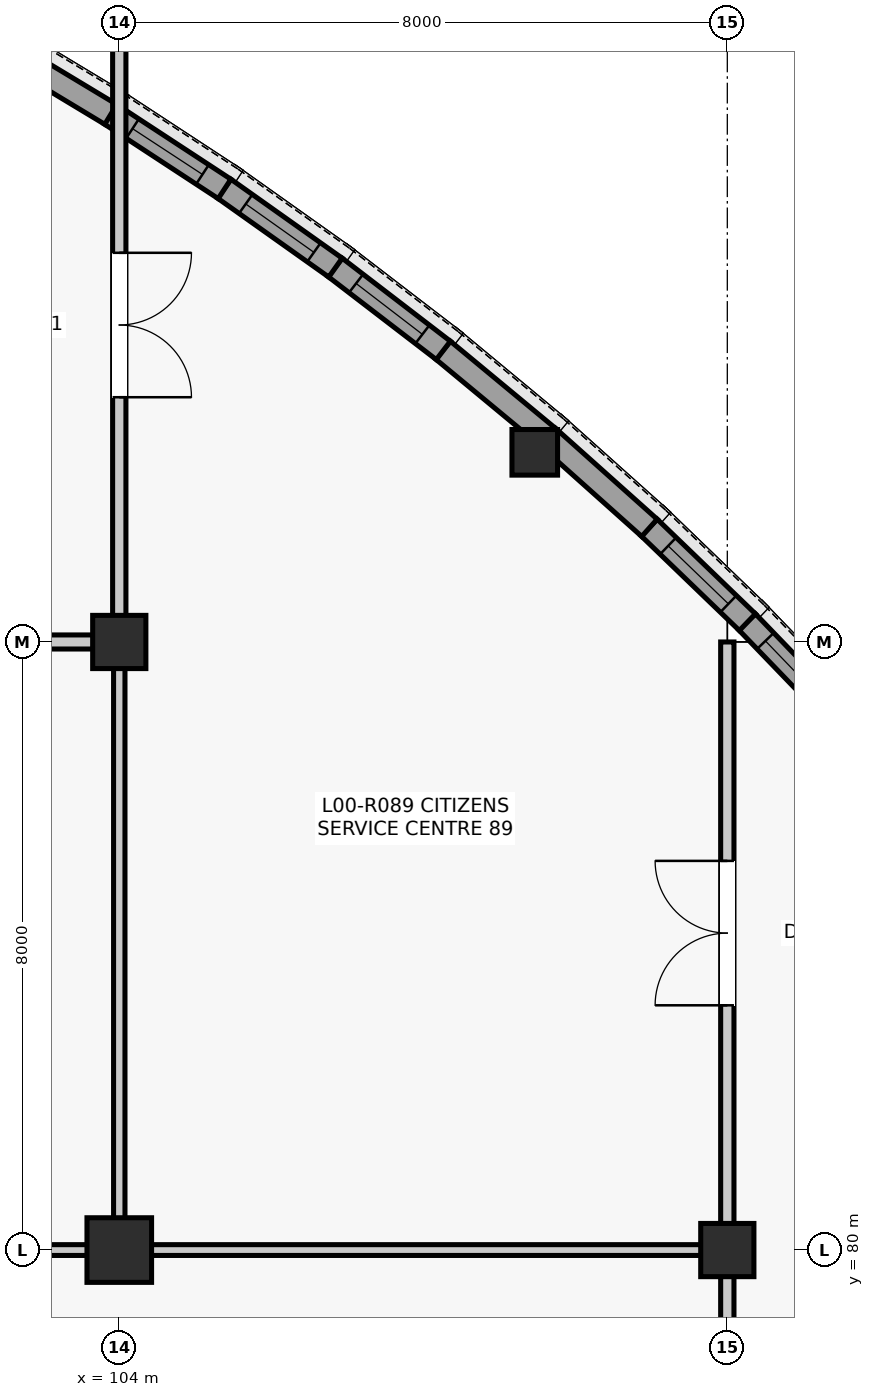
"""IFC4 building model, lengths in metres.
Left out: names, types, materials, properties, quantities, classifications, styles, units other than length and angle.
Written with IfcOpenShell. Run it as: python <this file> out.ifc"""

import sys

from ifc_helpers import new_model, si_unit, direction, frame, frame_2d, origin, origin_2d, place, context, subcontext, project, spatial, rectangle, extrude, element, fill, save


model = new_model("IFC4")
c1 = context("Model", 3, precision=1e-05, world=origin(), true_north=direction((0.0, 1.0)))
c2 = subcontext(c1, "Body", "Model", "MODEL_VIEW")
j1 = project(units=[si_unit("LENGTHUNIT", "METRE"), si_unit("PLANEANGLEUNIT", "RADIAN")], contexts=[c1])
p1 = place(None, origin())
s1 = spatial("IfcSite", under=j1, at=p1, CompositionType="ELEMENT")
p2 = place(p1, origin())
s2 = spatial("IfcBuilding", under=s1, at=p2, CompositionType="ELEMENT")
p3 = place(p2, origin())
s3 = spatial("IfcBuildingStorey", under=s2, at=p3, CompositionType="ELEMENT", Elevation=0.0)
p4 = place(p3, frame((104.0, 80.0, 0.0), z_axis=(0.0, 0.0, 1.0), x_axis=(1.0, 0.0, 0.0)))
e1 = element("IfcColumn", 1, at=p4, inside=s3, PredefinedType="COLUMN", context=c2, shape_type="SweptSolid", body=[
    extrude(rectangle(XDim=0.85, YDim=0.85, at=origin_2d()), origin(), (0.0, 0.0, 1.0), 5.28),
])
for number, where, z_axis, x_axis in (
    (2, (104.0, 88.0, 0.0), (0.0, 0.0, 1.0), (1.0, 0.0, 0.0)),
    (3, (112.0, 80.0, 0.0), (0.0, 0.0, 1.0), (1.0, 0.0, 0.0)),
):
    element("IfcColumn", number, at=place(p3, frame(where, z_axis=z_axis, x_axis=x_axis)), inside=s3, PredefinedType="COLUMN", context=c2, shape_type="SweptSolid", body=[
        extrude(rectangle(XDim=0.7, YDim=0.7, at=origin_2d()), origin(), (0.0, 0.0, 1.0), 5.28),
    ])
p5 = place(p3, frame((109.467, 90.495, 0.0), z_axis=(0.0, 0.0, 1.0), x_axis=(1.0, 0.0, 0.0)))
e4 = element("IfcColumn", 4, at=p5, inside=s3, PredefinedType="COLUMN", context=c2, shape_type="SweptSolid", body=[
    extrude(rectangle(XDim=0.6, YDim=0.6, at=origin_2d()), origin(), (0.0, 0.0, 1.0), 5.28),
])
p6 = place(p3, frame((113.506, 86.971, 0.0), z_axis=(0.0, 0.0, 1.0), x_axis=(-0.693722700342, 0.720242191926, 0.0)))
e5 = element("IfcWall", 5, at=p6, inside=s3, PredefinedType="SOLIDWALL", context=c2, shape_type="SweptSolid", body=[
    extrude(rectangle(XDim=1.795, YDim=0.305, at=frame_2d((0.897, 0.0))), origin(), (0.0, 0.0, 1.0), 5.035),
])
p7 = place(p6, frame((0.347, 0.0, 0.9)))
e6 = element("IfcOpeningElement", 6, at=p7, cuts=e5, PredefinedType="OPENING", context=c2, shape_type="SweptSolid", body=[
    extrude(rectangle(XDim=1.1, YDim=2.1, at=frame_2d((0.55, 1.05))), frame((0.0, 0.162, 0.0), z_axis=(0.0, -1.0, 0.0), x_axis=(1.0, 0.0, 0.0)), (0.0, 0.0, 1.0), 0.325),
])
p8 = place(p3, frame((112.264, 88.26, 0.0), z_axis=(0.0, 0.0, 1.0), x_axis=(-0.720242191926, 0.693722700342, 0.0)))
e7 = element("IfcWall", 7, at=p8, inside=s3, PredefinedType="SOLIDWALL", context=c2, shape_type="SweptSolid", body=[
    extrude(rectangle(XDim=1.795, YDim=0.305, at=frame_2d((0.897, 0.0))), origin(), (0.0, 0.0, 1.0), 5.035),
])
p9 = place(p8, frame((0.347, 0.0, 0.9)))
e8 = element("IfcOpeningElement", 8, at=p9, cuts=e7, PredefinedType="OPENING", context=c2, shape_type="SweptSolid", body=[
    extrude(rectangle(XDim=1.1, YDim=2.1, at=frame_2d((0.55, 1.05))), frame((0.0, 0.162, 0.0), z_axis=(0.0, -1.0, 0.0), x_axis=(1.0, 0.0, 0.0)), (0.0, 0.0, 1.0), 0.325),
])
p10 = place(p3, frame((110.976, 89.502, 0.0), z_axis=(0.0, 0.0, 1.0), x_axis=(-0.745703543965, 0.666277888361, 0.0)))
e9 = element("IfcWall", 9, at=p10, inside=s3, PredefinedType="SOLIDWALL", context=c2, shape_type="SweptSolid", body=[
    extrude(rectangle(XDim=1.795, YDim=0.305, at=frame_2d((0.897, 0.0))), origin(), (0.0, 0.0, 1.0), 5.035),
])
p11 = place(p3, frame((109.642, 90.694, 0.0), z_axis=(0.0, 0.0, 1.0), x_axis=(-0.769991012207, 0.638054732073, 0.0)))
e10 = element("IfcWall", 10, at=p11, inside=s3, PredefinedType="SOLIDWALL", context=c2, shape_type="SweptSolid", body=[
    extrude(rectangle(XDim=1.795, YDim=0.305, at=frame_2d((0.897, 0.0))), origin(), (0.0, 0.0, 1.0), 5.035),
])
p12 = place(p3, frame((108.264, 91.836, 0.0), z_axis=(0.0, 0.0, 1.0), x_axis=(-0.793341406114, 0.608776981616, 0.0)))
e11 = element("IfcWall", 11, at=p12, inside=s3, PredefinedType="SOLIDWALL", context=c2, shape_type="SweptSolid", body=[
    extrude(rectangle(XDim=1.795, YDim=0.305, at=frame_2d((0.897, 0.0))), origin(), (0.0, 0.0, 1.0), 5.035),
])
p13 = place(p12, frame((0.347, 0.0, 0.9)))
e12 = element("IfcOpeningElement", 12, at=p13, cuts=e11, PredefinedType="OPENING", context=c2, shape_type="SweptSolid", body=[
    extrude(rectangle(XDim=1.1, YDim=2.1, at=frame_2d((0.55, 1.05))), frame((0.0, 0.162, 0.0), z_axis=(0.0, -1.0, 0.0), x_axis=(1.0, 0.0, 0.0)), (0.0, 0.0, 1.0), 0.325),
])
p14 = place(p3, frame((106.844, 92.925, 0.0), z_axis=(0.0, 0.0, 1.0), x_axis=(-0.815567185578, 0.578662393636, 0.0)))
e13 = element("IfcWall", 13, at=p14, inside=s3, PredefinedType="SOLIDWALL", context=c2, shape_type="SweptSolid", body=[
    extrude(rectangle(XDim=1.795, YDim=0.305, at=frame_2d((0.897, 0.0))), origin(), (0.0, 0.0, 1.0), 5.035),
])
p15 = place(p14, frame((0.348, 0.0, 0.9)))
e14 = element("IfcOpeningElement", 14, at=p15, cuts=e13, PredefinedType="OPENING", context=c2, shape_type="SweptSolid", body=[
    extrude(rectangle(XDim=1.1, YDim=2.1, at=frame_2d((0.55, 1.05))), frame((0.0, 0.162, 0.0), z_axis=(0.0, -1.0, 0.0), x_axis=(1.0, 0.0, 0.0)), (0.0, 0.0, 1.0), 0.325),
])
p16 = place(p3, frame((105.385, 93.961, 0.0), z_axis=(0.0, 0.0, 1.0), x_axis=(-0.836686786408, 0.547681678944, 0.0)))
e15 = element("IfcWall", 15, at=p16, inside=s3, PredefinedType="SOLIDWALL", context=c2, shape_type="SweptSolid", body=[
    extrude(rectangle(XDim=1.795, YDim=0.305, at=frame_2d((0.897, 0.0))), origin(), (0.0, 0.0, 1.0), 5.035),
])
p17 = place(p16, frame((0.347, 0.0, 0.9)))
e16 = element("IfcOpeningElement", 16, at=p17, cuts=e15, PredefinedType="OPENING", context=c2, shape_type="SweptSolid", body=[
    extrude(rectangle(XDim=1.1, YDim=2.1, at=frame_2d((0.55, 1.05))), frame((0.0, 0.162, 0.0), z_axis=(0.0, -1.0, 0.0), x_axis=(1.0, 0.0, 0.0)), (0.0, 0.0, 1.0), 0.325),
])
p18 = place(p3, frame((103.888, 94.941, 0.0), z_axis=(0.0, 0.0, 1.0), x_axis=(-0.856543302071, 0.51607516088, 0.0)))
e17 = element("IfcWall", 17, at=p18, inside=s3, PredefinedType="SOLIDWALL", context=c2, shape_type="SweptSolid", body=[
    extrude(rectangle(XDim=1.795, YDim=0.305, at=frame_2d((0.897, 0.0))), origin(), (0.0, 0.0, 1.0), 5.035),
])
p19 = place(p3, frame((96.189, 80.0, 0.0), z_axis=(0.0, 0.0, 1.0), x_axis=(1.0, 0.0, 0.0)))
e18 = element("IfcWall", 18, at=p19, inside=s3, PredefinedType="PARTITIONING", context=c2, shape_type="SweptSolid", body=[
    extrude(rectangle(XDim=7.396, YDim=0.142, at=frame_2d((3.698, 0.0))), origin(), (0.0, 0.0, 1.0), 4.336),
])
p20 = place(p3, frame((104.0, 80.415, 0.0), z_axis=(0.0, 0.0, 1.0), x_axis=(0.0, 1.0, 0.0)))
e19 = element("IfcWall", 19, at=p20, inside=s3, PredefinedType="PARTITIONING", context=c2, shape_type="SweptSolid", body=[
    extrude(rectangle(XDim=7.245, YDim=0.15, at=frame_2d((3.623, 0.0))), origin(), (0.0, 0.0, 1.0), 4.471),
])
p21 = place(p3, frame((96.34, 88.0, 0.0), z_axis=(0.0, 0.0, 1.0), x_axis=(1.0, 0.0, 0.0)))
e20 = element("IfcWall", 20, at=p21, inside=s3, PredefinedType="PARTITIONING", context=c2, shape_type="SweptSolid", body=[
    extrude(rectangle(XDim=7.32, YDim=0.185, at=frame_2d((3.66, 0.0))), origin(), (0.0, 0.0, 1.0), 4.404),
])
p22 = place(p3, frame((104.0, 88.34, 0.0), z_axis=(0.0, 0.0, 1.0), x_axis=(0.0, 1.0, 0.0)))
e21 = element("IfcWall", 21, at=p22, inside=s3, PredefinedType="PARTITIONING", context=c2, shape_type="SweptSolid", body=[
    extrude(rectangle(XDim=7.66, YDim=0.175, at=frame_2d((3.83, 0.0))), origin(), (0.0, 0.0, 1.0), 5.025),
])
p23 = place(p22, frame((2.88, 0.0, 0.0)))
e22 = element("IfcOpeningElement", 22, at=p23, cuts=e21, PredefinedType="OPENING", context=c2, shape_type="SweptSolid", body=[
    extrude(rectangle(XDim=1.9, YDim=2.38, at=frame_2d((0.95, 1.19))), frame((0.0, 0.097, 0.0), z_axis=(0.0, -1.0, 0.0), x_axis=(1.0, 0.0, 0.0)), (0.0, 0.0, 1.0), 0.195),
])
p24 = place(p3, frame((112.0, 72.34, 0.0), z_axis=(0.0, 0.0, 1.0), x_axis=(0.0, 1.0, 0.0)))
e23 = element("IfcWall", 23, at=p24, inside=s3, PredefinedType="PARTITIONING", context=c2, shape_type="SweptSolid", body=[
    extrude(rectangle(XDim=7.32, YDim=0.175, at=frame_2d((3.66, 0.0))), origin(), (0.0, 0.0, 1.0), 4.471),
])
p25 = place(p24, frame((2.71, 0.0, 0.0)))
e24 = element("IfcOpeningElement", 24, at=p25, cuts=e23, PredefinedType="OPENING", context=c2, shape_type="SweptSolid", body=[
    extrude(rectangle(XDim=1.9, YDim=2.38, at=frame_2d((0.95, 1.19))), frame((0.0, 0.097, 0.0), z_axis=(0.0, -1.0, 0.0), x_axis=(1.0, 0.0, 0.0)), (0.0, 0.0, 1.0), 0.195),
])
p26 = place(p3, frame((104.415, 80.0, 0.0), z_axis=(0.0, 0.0, 1.0), x_axis=(1.0, 0.0, 0.0)))
e25 = element("IfcWall", 25, at=p26, inside=s3, PredefinedType="PARTITIONING", context=c2, shape_type="SweptSolid", body=[
    extrude(rectangle(XDim=7.245, YDim=0.142, at=frame_2d((3.623, 0.0))), origin(), (0.0, 0.0, 1.0), 4.404),
])
p27 = place(p3, frame((112.0, 80.34, 0.0), z_axis=(0.0, 0.0, 1.0), x_axis=(0.0, 1.0, 0.0)))
e26 = element("IfcWall", 26, at=p27, inside=s3, PredefinedType="PARTITIONING", context=c2, shape_type="SweptSolid", body=[
    extrude(rectangle(XDim=7.66, YDim=0.175, at=frame_2d((3.83, 0.0))), origin(), (0.0, 0.0, 1.0), 5.025),
])
p28 = place(p27, frame((2.88, 0.0, 0.0)))
e27 = element("IfcOpeningElement", 27, at=p28, cuts=e26, PredefinedType="OPENING", context=c2, shape_type="SweptSolid", body=[
    extrude(rectangle(XDim=1.9, YDim=2.38, at=frame_2d((0.95, 1.19))), frame((0.0, 0.097, 0.0), z_axis=(0.0, -1.0, 0.0), x_axis=(1.0, 0.0, 0.0)), (0.0, 0.0, 1.0), 0.195),
])
p29 = place(p7, origin())
e28 = element("IfcWindow", 28, at=p29, inside=s3, PartitioningType="SINGLE_PANEL", PredefinedType="WINDOW", context=c2, shape_type="SweptSolid", body=[
    extrude(rectangle(XDim=1.1, YDim=2.1, at=frame_2d((0.55, 1.05))), frame((0.0, 0.03, 0.0), z_axis=(0.0, -1.0, 0.0), x_axis=(1.0, 0.0, 0.0)), (0.0, 0.0, 1.0), 0.06),
])
fill(e6, e28)
p30 = place(p9, origin())
e29 = element("IfcWindow", 29, at=p30, inside=s3, PartitioningType="SINGLE_PANEL", PredefinedType="WINDOW", context=c2, shape_type="SweptSolid", body=[
    extrude(rectangle(XDim=1.1, YDim=2.1, at=frame_2d((0.55, 1.05))), frame((0.0, 0.03, 0.0), z_axis=(0.0, -1.0, 0.0), x_axis=(1.0, 0.0, 0.0)), (0.0, 0.0, 1.0), 0.06),
])
fill(e8, e29)
p31 = place(p13, origin())
e30 = element("IfcWindow", 30, at=p31, inside=s3, PartitioningType="SINGLE_PANEL", PredefinedType="WINDOW", context=c2, shape_type="SweptSolid", body=[
    extrude(rectangle(XDim=1.1, YDim=2.1, at=frame_2d((0.55, 1.05))), frame((0.0, 0.03, 0.0), z_axis=(0.0, -1.0, 0.0), x_axis=(1.0, 0.0, 0.0)), (0.0, 0.0, 1.0), 0.06),
])
fill(e12, e30)
p32 = place(p15, origin())
e31 = element("IfcWindow", 31, at=p32, inside=s3, PartitioningType="SINGLE_PANEL", PredefinedType="WINDOW", context=c2, shape_type="SweptSolid", body=[
    extrude(rectangle(XDim=1.1, YDim=2.1, at=frame_2d((0.55, 1.05))), frame((0.0, 0.03, 0.0), z_axis=(0.0, -1.0, 0.0), x_axis=(1.0, 0.0, 0.0)), (0.0, 0.0, 1.0), 0.06),
])
fill(e14, e31)
p33 = place(p17, origin())
e32 = element("IfcWindow", 32, at=p33, inside=s3, PartitioningType="SINGLE_PANEL", PredefinedType="WINDOW", context=c2, shape_type="SweptSolid", body=[
    extrude(rectangle(XDim=1.1, YDim=2.1, at=frame_2d((0.55, 1.05))), frame((0.0, 0.03, 0.0), z_axis=(0.0, -1.0, 0.0), x_axis=(1.0, 0.0, 0.0)), (0.0, 0.0, 1.0), 0.06),
])
fill(e16, e32)
p34 = place(p23, frame((1.9, 0.0, 0.0), z_axis=(0.0, 0.0, 1.0), x_axis=(-1.0, 0.0, 0.0)))
e33 = element("IfcDoor", 33, at=p34, inside=s3, OperationType="DOUBLE_DOOR_SINGLE_SWING", PredefinedType="DOOR", context=c2, shape_type="SweptSolid", body=[
    extrude(rectangle(XDim=1.9, YDim=2.38, at=frame_2d((0.95, 1.19))), frame((0.0, 0.025, 0.0), z_axis=(0.0, -1.0, 0.0), x_axis=(1.0, 0.0, 0.0)), (0.0, 0.0, 1.0), 0.05),
])
fill(e22, e33)
p35 = place(p28, origin())
e34 = element("IfcDoor", 34, at=p35, inside=s3, OperationType="DOUBLE_DOOR_SINGLE_SWING", PredefinedType="DOOR", context=c2, shape_type="SweptSolid", body=[
    extrude(rectangle(XDim=1.9, YDim=2.38, at=frame_2d((0.95, 1.19))), frame((0.0, 0.025, 0.0), z_axis=(0.0, -1.0, 0.0), x_axis=(1.0, 0.0, 0.0)), (0.0, 0.0, 1.0), 0.05),
])
fill(e27, e34)
save(model, sys.argv[1])
